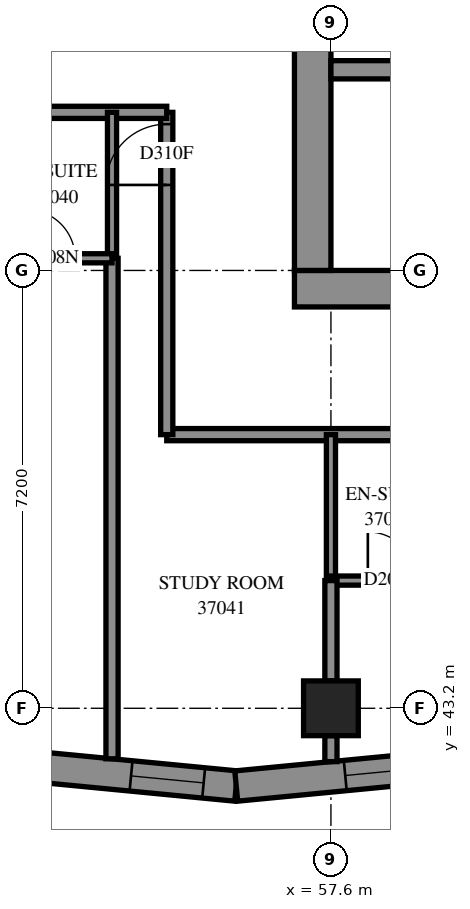
"""IFC4 building model, lengths in metres.
Left out: names, types, materials, properties, quantities, classifications, styles, units other than length and angle.
Written with IfcOpenShell. Run it as: python <this file> out.ifc"""

import sys

from ifc_helpers import new_model, si_unit, direction, frame, frame_2d, origin, origin_2d, place, context, subcontext, project, spatial, polyline, rectangle, outline, extrude, element, fill, save


model = new_model("IFC4")
c1 = context("Model", 3, precision=1e-05, world=origin(), true_north=direction((0.0, 1.0)))
c2 = subcontext(c1, "Body", "Model", "MODEL_VIEW")
j1 = project(units=[si_unit("LENGTHUNIT", "METRE"), si_unit("PLANEANGLEUNIT", "RADIAN")], contexts=[c1])
p1 = place(None, origin())
s1 = spatial("IfcSite", under=j1, at=p1, CompositionType="ELEMENT")
p2 = place(p1, origin())
s2 = spatial("IfcBuilding", under=s1, at=p2, CompositionType="ELEMENT")
p3 = place(p2, frame((0.0, 0.0, 138.8)))
s3 = spatial("IfcBuildingStorey", under=s2, at=p3, CompositionType="ELEMENT", Elevation=138.8)
p4 = place(p3, frame((57.6, 43.2, 0.0), z_axis=(0.0, 0.0, 1.0), x_axis=(1.0, 0.0, 0.0)))
e1 = element("IfcColumn", 1, at=p4, inside=s3, PredefinedType="COLUMN", context=c2, shape_type="SweptSolid", body=[
    extrude(rectangle(XDim=0.9, YDim=0.9, at=origin_2d()), origin(), (0.0, 0.0, 1.0), 3.1),
])
p5 = place(p3, frame((57.0, 50.1, -0.3), z_axis=(0.0, 0.0, 1.0), x_axis=(1.0, 0.0, 0.0)))
e2 = element("IfcWall", 2, at=p5, inside=s3, PredefinedType="SHEAR", context=c2, shape_type="SweptSolid", body=[
    extrude(rectangle(XDim=15.6, YDim=0.6, at=frame_2d((7.8, 0.0))), origin(), (0.0, 0.0, 1.0), 2.7),
])
p6 = place(p3, frame((57.3, 50.4, -0.3), z_axis=(0.0, 0.0, 1.0), x_axis=(0.0, 1.0, 0.0)))
e3 = element("IfcWall", 3, at=p6, inside=s3, PredefinedType="SHEAR", context=c2, shape_type="SweptSolid", body=[
    extrude(rectangle(XDim=14.4, YDim=0.6, at=frame_2d((7.2, 0.0))), origin(), (0.0, 0.0, 1.0), 2.7),
])
p7 = place(p6, frame((4.55, 0.0, 0.3)))
e4 = element("IfcOpeningElement", 4, at=p7, cuts=e3, PredefinedType="OPENING", context=c2, shape_type="SweptSolid", body=[
    extrude(rectangle(XDim=1.1, YDim=2.1, at=frame_2d((0.55, 1.05))), frame((0.0, 0.31, 0.0), z_axis=(0.0, -1.0, 0.0), x_axis=(1.0, 0.0, 0.0)), (0.0, 0.0, 1.0), 0.62),
])
p8 = place(p6, frame((11.35, 0.0, 0.3)))
e5 = element("IfcOpeningElement", 5, at=p8, cuts=e3, PredefinedType="OPENING", context=c2, shape_type="SweptSolid", body=[
    extrude(rectangle(XDim=1.1, YDim=2.1, at=frame_2d((0.55, 1.05))), frame((0.0, 0.31, 0.0), z_axis=(0.0, -1.0, 0.0), x_axis=(1.0, 0.0, 0.0)), (0.0, 0.0, 1.0), 0.62),
])
p9 = place(p3, frame((57.6, 53.7, 0.0), z_axis=(0.0, 0.0, 1.0), x_axis=(1.0, 0.0, 0.0)))
e6 = element("IfcWall", 6, at=p9, inside=s3, PredefinedType="SOLIDWALL", context=c2, shape_type="SweptSolid", body=[
    extrude(rectangle(XDim=14.4, YDim=0.3, at=frame_2d((7.2, 0.0))), origin(), (0.0, 0.0, 1.0), 3.1),
])
p10 = place(p9, frame((1.35, 0.0, 0.0)))
e7 = element("IfcOpeningElement", 7, at=p10, cuts=e6, PredefinedType="OPENING", context=c2, shape_type="SweptSolid", body=[
    extrude(rectangle(XDim=0.9, YDim=2.1, at=frame_2d((0.45, 1.05))), frame((0.0, 0.16, 0.0), z_axis=(0.0, -1.0, 0.0), x_axis=(1.0, 0.0, 0.0)), (0.0, 0.0, 1.0), 0.32),
])
p11 = place(p9, frame((4.95, 0.0, 0.0)))
e8 = element("IfcOpeningElement", 8, at=p11, cuts=e6, PredefinedType="OPENING", context=c2, shape_type="SweptSolid", body=[
    extrude(rectangle(XDim=0.9, YDim=2.1, at=frame_2d((0.45, 1.05))), frame((0.0, 0.16, 0.0), z_axis=(0.0, -1.0, 0.0), x_axis=(1.0, 0.0, 0.0)), (0.0, 0.0, 1.0), 0.32),
])
p12 = place(p9, frame((8.55, 0.0, 0.0)))
e9 = element("IfcOpeningElement", 9, at=p12, cuts=e6, PredefinedType="OPENING", context=c2, shape_type="SweptSolid", body=[
    extrude(rectangle(XDim=0.9, YDim=2.1, at=frame_2d((0.45, 1.05))), frame((0.0, 0.16, 0.0), z_axis=(0.0, -1.0, 0.0), x_axis=(1.0, 0.0, 0.0)), (0.0, 0.0, 1.0), 0.32),
])
p13 = place(p9, frame((12.05, 0.0, 0.0)))
e10 = element("IfcOpeningElement", 10, at=p13, cuts=e6, PredefinedType="OPENING", context=c2, shape_type="SweptSolid", body=[
    extrude(rectangle(XDim=1.1, YDim=2.1, at=frame_2d((0.55, 1.05))), frame((0.0, 0.16, 0.0), z_axis=(0.0, -1.0, 0.0), x_axis=(1.0, 0.0, 0.0)), (0.0, 0.0, 1.0), 0.32),
])
p14 = place(p3, frame((52.6, 42.253, 0.0), z_axis=(0.0, 0.0, 1.0), x_axis=(0.9953825051, -0.0959878563, 0.0)))
e11 = element("IfcWall", 11, at=p14, inside=s3, PredefinedType="SOLIDWALL", context=c2, shape_type="SweptSolid", body=[
    extrude(outline(polyline([(0.046, -0.25), (3.483, -0.25), (3.435, 0.25), (-0.046, 0.25), (0.046, -0.25)])), origin(), (0.0, 0.0, 1.0), 3.1),
])
p15 = place(p14, frame((1.721, 0.0, 0.45)))
e12 = element("IfcOpeningElement", 12, at=p15, cuts=e11, PredefinedType="OPENING", context=c2, shape_type="SweptSolid", body=[
    extrude(rectangle(XDim=1.2, YDim=2.5, at=frame_2d((0.6, 1.25))), frame((0.0, 0.26, 0.0), z_axis=(0.0, -1.0, 0.0), x_axis=(1.0, 0.0, 0.0)), (0.0, 0.0, 1.0), 0.52),
])
p16 = place(p3, frame((56.043, 41.921, 0.0), z_axis=(0.0, 0.0, 1.0), x_axis=(0.995380467, 0.096008989, 0.0)))
e13 = element("IfcWall", 13, at=p16, inside=s3, PredefinedType="SOLIDWALL", context=c2, shape_type="SweptSolid", body=[
    extrude(outline(polyline([(-0.024, -0.25), (3.413, -0.25), (3.461, 0.25), (0.024, 0.25), (-0.024, -0.25)])), origin(), (0.0, 0.0, 1.0), 3.1),
])
p17 = place(p16, frame((1.801, 0.0, 0.45)))
e14 = element("IfcOpeningElement", 14, at=p17, cuts=e13, PredefinedType="OPENING", context=c2, shape_type="SweptSolid", body=[
    extrude(rectangle(XDim=1.2, YDim=2.5, at=frame_2d((0.6, 1.25))), frame((0.0, 0.26, 0.0), z_axis=(0.0, -1.0, 0.0), x_axis=(1.0, 0.0, 0.0)), (0.0, 0.0, 1.0), 0.52),
])
p18 = place(p3, frame((54.9, 47.7, 0.0), z_axis=(0.0, 0.0, 1.0), x_axis=(1.0, 0.0, 0.0)))
e15 = element("IfcWall", 15, at=p18, inside=s3, PredefinedType="PARTITIONING", context=c2, shape_type="SweptSolid", body=[
    extrude(rectangle(XDim=19.326, YDim=0.2, at=frame_2d((9.663, 0.0))), origin(), (0.0, 0.0, 1.0), 3.1),
])
p19 = place(p18, frame((5.0, 0.0, 0.0)))
e16 = element("IfcOpeningElement", 16, at=p19, cuts=e15, PredefinedType="OPENING", context=c2, shape_type="SweptSolid", body=[
    extrude(rectangle(XDim=0.9, YDim=2.1, at=frame_2d((0.45, 1.05))), frame((0.0, 0.11, 0.0), z_axis=(0.0, -1.0, 0.0), x_axis=(1.0, 0.0, 0.0)), (0.0, 0.0, 1.0), 0.22),
])
p20 = place(p18, frame((12.2, 0.0, 0.0)))
e17 = element("IfcOpeningElement", 17, at=p20, cuts=e15, PredefinedType="OPENING", context=c2, shape_type="SweptSolid", body=[
    extrude(rectangle(XDim=0.9, YDim=2.1, at=frame_2d((0.45, 1.05))), frame((0.0, 0.11, 0.0), z_axis=(0.0, -1.0, 0.0), x_axis=(1.0, 0.0, 0.0)), (0.0, 0.0, 1.0), 0.22),
])
p21 = place(p18, frame((6.7, 0.0, 0.0)))
e18 = element("IfcOpeningElement", 18, at=p21, cuts=e15, PredefinedType="OPENING", context=c2, shape_type="SweptSolid", body=[
    extrude(rectangle(XDim=0.9, YDim=2.1, at=frame_2d((0.45, 1.05))), frame((0.0, 0.11, 0.0), z_axis=(0.0, -1.0, 0.0), x_axis=(1.0, 0.0, 0.0)), (0.0, 0.0, 1.0), 0.22),
])
p22 = place(p18, frame((13.9, 0.0, 0.0)))
e19 = element("IfcOpeningElement", 19, at=p22, cuts=e15, PredefinedType="OPENING", context=c2, shape_type="SweptSolid", body=[
    extrude(rectangle(XDim=0.9, YDim=2.1, at=frame_2d((0.45, 1.05))), frame((0.0, 0.11, 0.0), z_axis=(0.0, -1.0, 0.0), x_axis=(1.0, 0.0, 0.0)), (0.0, 0.0, 1.0), 0.22),
])
p23 = place(p3, frame((54.0, 42.369, 0.0), z_axis=(0.0, 0.0, 1.0), x_axis=(0.0, 1.0, 0.0)))
e20 = element("IfcWall", 20, at=p23, inside=s3, PredefinedType="PARTITIONING", context=c2, shape_type="SweptSolid", body=[
    extrude(rectangle(XDim=8.231, YDim=0.2, at=frame_2d((4.115, 0.0))), origin(), (0.0, 0.0, 1.0), 3.1),
])
p24 = place(p3, frame((54.9, 47.7, 0.0), z_axis=(0.0, 0.0, 1.0), x_axis=(0.0, 1.0, 0.0)))
e21 = element("IfcWall", 21, at=p24, inside=s3, PredefinedType="PARTITIONING", context=c2, shape_type="SweptSolid", body=[
    extrude(rectangle(XDim=5.3, YDim=0.2, at=frame_2d((2.65, 0.0))), origin(), (0.0, 0.0, 1.0), 3.1),
])
p25 = place(p24, frame((4.106, 0.0, 0.0)))
e22 = element("IfcOpeningElement", 22, at=p25, cuts=e21, PredefinedType="OPENING", context=c2, shape_type="SweptSolid", body=[
    extrude(rectangle(XDim=1.0, YDim=2.1, at=frame_2d((0.5, 1.05))), frame((0.0, 0.11, 0.0), z_axis=(0.0, -1.0, 0.0), x_axis=(1.0, 0.0, 0.0)), (0.0, 0.0, 1.0), 0.22),
])
p26 = place(p3, frame((50.4, 53.0, 0.0), z_axis=(0.0, 0.0, 1.0), x_axis=(1.0, 0.0, 0.0)))
e23 = element("IfcWall", 23, at=p26, inside=s3, PredefinedType="PARTITIONING", context=c2, shape_type="SweptSolid", body=[
    extrude(rectangle(XDim=4.5, YDim=0.2, at=frame_2d((2.25, 0.0))), origin(), (0.0, 0.0, 1.0), 3.1),
])
p27 = place(p26, frame((0.4, 0.0, 0.0)))
e24 = element("IfcOpeningElement", 24, at=p27, cuts=e23, PredefinedType="OPENING", context=c2, shape_type="SweptSolid", body=[
    extrude(rectangle(XDim=0.9, YDim=2.1, at=frame_2d((0.45, 1.05))), frame((0.0, 0.11, 0.0), z_axis=(0.0, -1.0, 0.0), x_axis=(1.0, 0.0, 0.0)), (0.0, 0.0, 1.0), 0.22),
])
for number, where, z_axis, x_axis in (
    (25, (57.6, 45.3, 0.0), (0.0, 0.0, 1.0), (0.0, 1.0, 0.0)),
    (26, (54.0, 50.6, 0.0), (0.0, 0.0, 1.0), (0.0, 1.0, 0.0)),
):
    element("IfcWall", number, at=place(p3, frame(where, z_axis=z_axis, x_axis=x_axis)), inside=s3, PredefinedType="PARTITIONING", context=c2, shape_type="SweptSolid", body=[
        extrude(rectangle(XDim=2.4, YDim=0.15, at=frame_2d((1.2, 0.0))), origin(), (0.0, 0.0, 1.0), 3.1),
    ])
p28 = place(p3, frame((52.1, 50.6, 0.0), z_axis=(0.0, 0.0, 1.0), x_axis=(1.0, 0.0, 0.0)))
e27 = element("IfcWall", 27, at=p28, inside=s3, PredefinedType="PARTITIONING", context=c2, shape_type="SweptSolid", body=[
    extrude(rectangle(XDim=1.9, YDim=0.15, at=frame_2d((0.95, 0.0))), origin(), (0.0, 0.0, 1.0), 3.1),
])
p29 = place(p28, frame((0.493, 0.0, 0.0)))
e28 = element("IfcOpeningElement", 28, at=p29, cuts=e27, PredefinedType="OPENING", context=c2, shape_type="SweptSolid", body=[
    extrude(rectangle(XDim=0.8, YDim=2.1, at=frame_2d((0.4, 1.05))), frame((0.0, 0.085, 0.0), z_axis=(0.0, -1.0, 0.0), x_axis=(1.0, 0.0, 0.0)), (0.0, 0.0, 1.0), 0.17),
])
p30 = place(p3, frame((57.6, 45.3, 0.0), z_axis=(0.0, 0.0, 1.0), x_axis=(1.0, 0.0, 0.0)))
e29 = element("IfcWall", 29, at=p30, inside=s3, PredefinedType="PARTITIONING", context=c2, shape_type="SweptSolid", body=[
    extrude(rectangle(XDim=1.9, YDim=0.15, at=frame_2d((0.95, 0.0))), origin(), (0.0, 0.0, 1.0), 3.1),
])
p31 = place(p30, frame((0.607, 0.0, 0.0)))
e30 = element("IfcOpeningElement", 30, at=p31, cuts=e29, PredefinedType="OPENING", context=c2, shape_type="SweptSolid", body=[
    extrude(rectangle(XDim=0.8, YDim=2.1, at=frame_2d((0.4, 1.05))), frame((0.0, 0.085, 0.0), z_axis=(0.0, -1.0, 0.0), x_axis=(1.0, 0.0, 0.0)), (0.0, 0.0, 1.0), 0.17),
])
p32 = place(p3, frame((57.6, 43.65, 0.0), z_axis=(0.0, 0.0, 1.0), x_axis=(0.0, 1.0, 0.0)))
e31 = element("IfcWall", 31, at=p32, inside=s3, PredefinedType="PARTITIONING", context=c2, shape_type="SweptSolid", body=[
    extrude(rectangle(XDim=1.65, YDim=0.2, at=frame_2d((0.825, 0.0))), origin(), (0.0, 0.0, 1.0), 3.1),
])
p33 = place(p3, frame((57.6, 42.322, 0.0), z_axis=(0.0, 0.0, 1.0), x_axis=(0.0, 1.0, 0.0)))
e32 = element("IfcWall", 32, at=p33, inside=s3, PredefinedType="PARTITIONING", context=c2, shape_type="SweptSolid", body=[
    extrude(rectangle(XDim=0.427, YDim=0.2, at=frame_2d((0.214, 0.0))), origin(), (0.0, 0.0, 1.0), 3.1),
])
p34 = place(p15, origin())
e33 = element("IfcWindow", 33, at=p34, inside=s3, PartitioningType="SINGLE_PANEL", PredefinedType="WINDOW", context=c2, shape_type="SweptSolid", body=[
    extrude(rectangle(XDim=1.2, YDim=2.5, at=frame_2d((0.6, 1.25))), frame((0.0, 0.18, 0.0), z_axis=(0.0, -1.0, 0.0), x_axis=(1.0, 0.0, 0.0)), (0.0, 0.0, 1.0), 0.06),
])
fill(e12, e33)
p35 = place(p17, origin())
e34 = element("IfcWindow", 34, at=p35, inside=s3, PartitioningType="SINGLE_PANEL", PredefinedType="WINDOW", context=c2, shape_type="SweptSolid", body=[
    extrude(rectangle(XDim=1.2, YDim=2.5, at=frame_2d((0.6, 1.25))), frame((0.0, 0.18, 0.0), z_axis=(0.0, -1.0, 0.0), x_axis=(1.0, 0.0, 0.0)), (0.0, 0.0, 1.0), 0.06),
])
fill(e14, e34)
p36 = place(p29, origin())
e35 = element("IfcDoor", 35, at=p36, inside=s3, OperationType="SINGLE_SWING_RIGHT", PredefinedType="DOOR", context=c2, shape_type="SweptSolid", body=[
    extrude(rectangle(XDim=0.8, YDim=2.1, at=frame_2d((0.4, 1.05))), frame((0.0, 0.025, 0.0), z_axis=(0.0, -1.0, 0.0), x_axis=(1.0, 0.0, 0.0)), (0.0, 0.0, 1.0), 0.05),
])
fill(e28, e35)
p37 = place(p25, origin())
e36 = element("IfcDoor", 36, at=p37, inside=s3, OperationType="SINGLE_SWING_RIGHT", PredefinedType="DOOR", context=c2, shape_type="SweptSolid", body=[
    extrude(rectangle(XDim=1.0, YDim=2.1, at=frame_2d((0.5, 1.05))), frame((0.0, 0.025, 0.0), z_axis=(0.0, -1.0, 0.0), x_axis=(1.0, 0.0, 0.0)), (0.0, 0.0, 1.0), 0.05),
])
fill(e22, e36)
p38 = place(p31, origin())
e37 = element("IfcDoor", 37, at=p38, inside=s3, OperationType="SINGLE_SWING_RIGHT", PredefinedType="DOOR", context=c2, shape_type="SweptSolid", body=[
    extrude(rectangle(XDim=0.8, YDim=2.1, at=frame_2d((0.4, 1.05))), frame((0.0, 0.025, 0.0), z_axis=(0.0, -1.0, 0.0), x_axis=(1.0, 0.0, 0.0)), (0.0, 0.0, 1.0), 0.05),
])
fill(e30, e37)
save(model, sys.argv[1])
